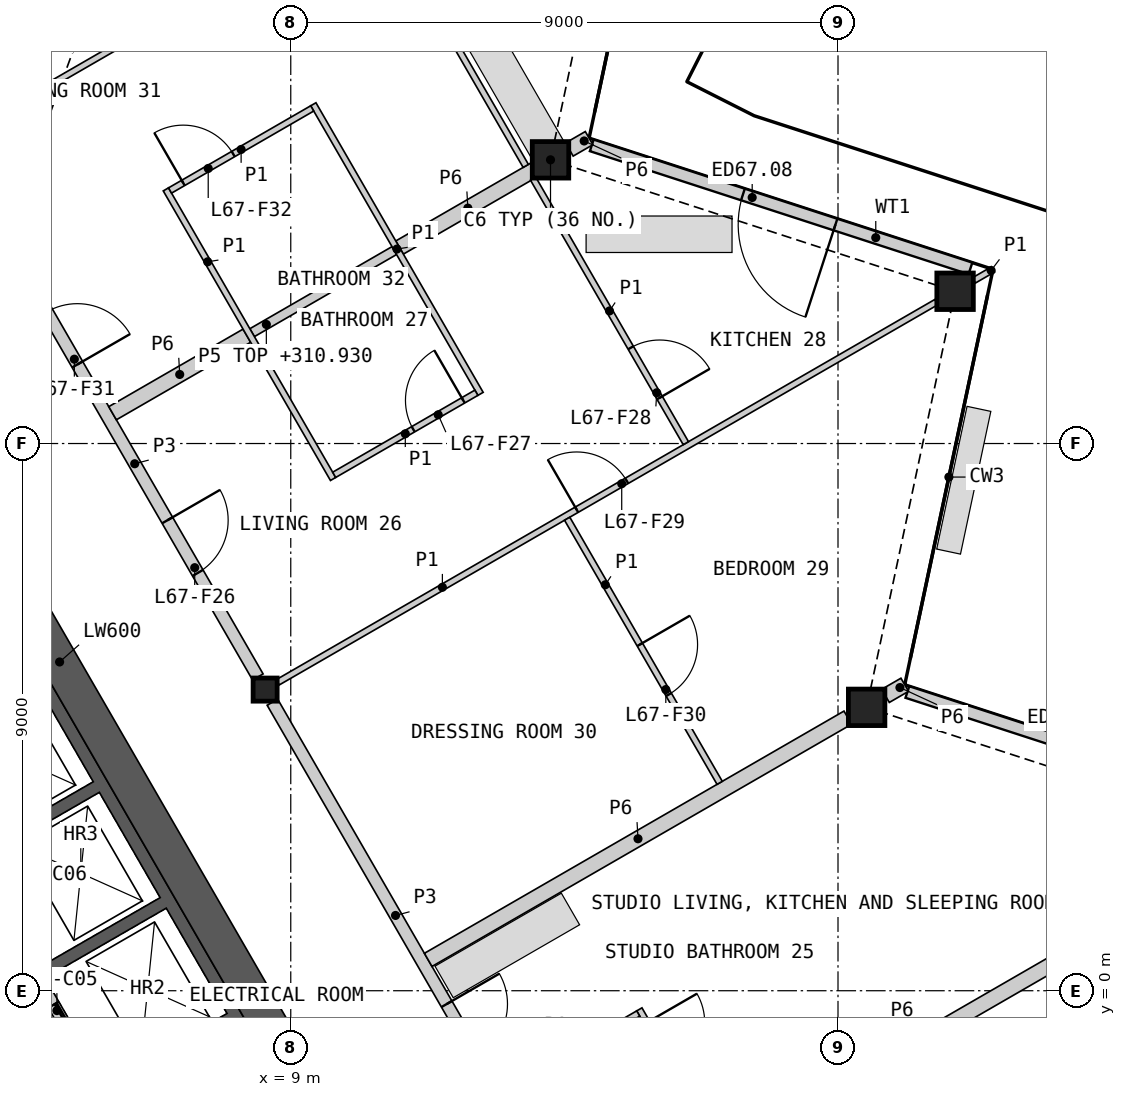
"""IFC4 building model, lengths in metres.
Left out: names, types, materials, properties, quantities, classifications, styles, units other than length and angle.
Written with IfcOpenShell. Run it as: python <this file> out.ifc"""

import sys

from ifc_helpers import new_model, si_unit, direction, frame, frame_2d, origin, origin_2d, place, context, subcontext, project, spatial, polyline, rectangle, hollow_rectangle, i_section, outline, extrude, element, fill, save


model = new_model("IFC4")
c1 = context("Model", 3, precision=1e-05, world=origin(), true_north=direction((0.0, 1.0)))
c2 = subcontext(c1, "Body", "Model", "MODEL_VIEW")
j1 = project(units=[si_unit("LENGTHUNIT", "METRE"), si_unit("PLANEANGLEUNIT", "RADIAN")], contexts=[c1])
p1 = place(None, origin())
s1 = spatial("IfcSite", under=j1, at=p1, CompositionType="ELEMENT")
p2 = place(p1, origin())
s2 = spatial("IfcBuilding", under=s1, at=p2, CompositionType="ELEMENT")
p3 = place(p2, frame((0.0, 0.0, 308.6)))
s3 = spatial("IfcBuildingStorey", under=s2, at=p3, CompositionType="ELEMENT", Elevation=308.6)
for number, where, z_axis, x_axis in (
    (1, (18.471, 4.661, 0.0), (0.0, 0.0, 1.0), (1.0, 0.0, 0.0)),
    (2, (19.926, 11.504, 0.0), (0.0, 0.0, 1.0), (1.0, 0.0, 0.0)),
    (3, (13.272, 13.666, 0.0), (0.0, 0.0, 1.0), (1.0, 0.0, 0.0)),
):
    element("IfcColumn", number, at=place(p3, frame(where, z_axis=z_axis, x_axis=x_axis)), inside=s3, PredefinedType="COLUMN", context=c2, shape_type="SweptSolid", body=[
        extrude(hollow_rectangle(XDim=0.6, YDim=0.6, WallThickness=0.04, at=origin_2d()), origin(), (0.0, 0.0, 1.0), 3.4),
    ])
p4 = place(p3, frame((8.578, 4.953, 0.0), z_axis=(0.0, 0.0, 1.0), x_axis=(1.0, 0.0, 0.0)))
e4 = element("IfcColumn", 4, at=p4, inside=s3, PredefinedType="COLUMN", context=c2, shape_type="SweptSolid", body=[
    extrude(i_section(OverallWidth=0.396, OverallDepth=0.381, WebThickness=0.019, FlangeThickness=0.03, at=origin_2d()), origin(), (0.0, 0.0, 1.0), 3.4),
])
p5 = place(p3, frame((25.398, 2.88, 0.0), z_axis=(0.0, 0.0, 1.0), x_axis=(-0.95105697409, 0.309015585424, 0.0)))
e5 = element("IfcWall", 5, at=p5, inside=s3, PredefinedType="SOLIDWALL", context=c2, shape_type="SweptSolid", body=[
    extrude(rectangle(XDim=6.579, YDim=0.2, at=frame_2d((3.29, 0.0))), origin(), (0.0, 0.0, 1.0), 2.488),
])
p6 = place(p5, frame((2.364, 0.0, 0.0)))
e6 = element("IfcOpeningElement", 6, at=p6, cuts=e5, PredefinedType="OPENING", context=c2, shape_type="SweptSolid", body=[
    extrude(rectangle(XDim=1.6, YDim=2.25, at=frame_2d((0.8, 1.125))), frame((0.0, 0.11, 0.0), z_axis=(0.0, -1.0, 0.0), x_axis=(1.0, 0.0, 0.0)), (0.0, 0.0, 1.0), 0.22),
])
p7 = place(p3, frame((20.178, 11.88, 0.0), z_axis=(0.0, 0.0, 1.0), x_axis=(-0.951053245104, 0.309027061884, 0.0)))
e7 = element("IfcWall", 7, at=p7, inside=s3, PredefinedType="SOLIDWALL", context=c2, shape_type="SweptSolid", body=[
    extrude(rectangle(XDim=6.549, YDim=0.2, at=frame_2d((3.274, 0.0))), origin(), (0.0, 0.0, 1.0), 2.488),
])
p8 = place(p7, frame((2.334, 0.0, 0.0)))
e8 = element("IfcOpeningElement", 8, at=p8, cuts=e7, PredefinedType="OPENING", context=c2, shape_type="SweptSolid", body=[
    extrude(rectangle(XDim=1.6, YDim=2.25, at=frame_2d((0.8, 1.125))), frame((0.0, 0.11, 0.0), z_axis=(0.0, -1.0, 0.0), x_axis=(1.0, 0.0, 0.0)), (0.0, 0.0, 1.0), 0.22),
])
p9 = place(p3, origin())
e9 = element("IfcWall", 9, at=p9, inside=s3, PredefinedType="SHEAR", context=c2, shape_type="SweptSolid", body=[
    extrude(outline(polyline([(1.561, 6.097), (3.731, 7.35), (8.231, -0.444), (6.061, -1.697), (5.96, -1.524), (7.952, -0.374), (6.952, 1.358), (4.96, 0.208), (4.861, 0.381), (6.852, 1.531), (5.852, 3.263), (3.861, 2.113), (3.76, 2.287), (5.752, 3.437), (4.752, 5.169), (2.76, 4.019), (2.66, 4.192), (4.652, 5.342), (3.652, 7.074), (1.66, 5.924), (1.561, 6.097)])), origin(), (0.0, 0.0, 1.0), 3.1),
])
p10 = place(p3, frame((5.817, -1.476, 0.0), z_axis=(0.0, 0.0, 1.0), x_axis=(-0.500002616675, 0.866023893041, 0.0)))
e10 = element("IfcWall", 10, at=p10, inside=s3, PredefinedType="SOLIDWALL", context=c2, shape_type="SweptSolid", body=[
    extrude(rectangle(XDim=8.373, YDim=0.2, at=frame_2d((4.187, 0.0))), origin(), (0.0, 0.0, 1.0), 3.1),
])
p11 = place(p10, frame((0.337, 0.0, 0.0)))
e11 = element("IfcOpeningElement", 11, at=p11, cuts=e10, PredefinedType="OPENING", context=c2, shape_type="SweptSolid", body=[
    extrude(rectangle(XDim=1.1, YDim=2.1, at=frame_2d((0.55, 1.05))), frame((0.0, 0.11, 0.0), z_axis=(0.0, -1.0, 0.0), x_axis=(1.0, 0.0, 0.0)), (0.0, 0.0, 1.0), 0.22),
])
p12 = place(p10, frame((2.537, 0.0, 0.0)))
e12 = element("IfcOpeningElement", 12, at=p12, cuts=e10, PredefinedType="OPENING", context=c2, shape_type="SweptSolid", body=[
    extrude(rectangle(XDim=1.1, YDim=2.1, at=frame_2d((0.55, 1.05))), frame((0.0, 0.11, 0.0), z_axis=(0.0, -1.0, 0.0), x_axis=(1.0, 0.0, 0.0)), (0.0, 0.0, 1.0), 0.22),
])
p13 = place(p10, frame((4.737, 0.0, 0.0)))
e13 = element("IfcOpeningElement", 13, at=p13, cuts=e10, PredefinedType="OPENING", context=c2, shape_type="SweptSolid", body=[
    extrude(rectangle(XDim=1.1, YDim=2.1, at=frame_2d((0.55, 1.05))), frame((0.0, 0.11, 0.0), z_axis=(0.0, -1.0, 0.0), x_axis=(1.0, 0.0, 0.0)), (0.0, 0.0, 1.0), 0.22),
])
p14 = place(p10, frame((7.037, 0.0, 0.0)))
e14 = element("IfcOpeningElement", 14, at=p14, cuts=e10, PredefinedType="OPENING", context=c2, shape_type="SweptSolid", body=[
    extrude(rectangle(XDim=0.9, YDim=2.1, at=frame_2d((0.45, 1.05))), frame((0.0, 0.11, 0.0), z_axis=(0.0, -1.0, 0.0), x_axis=(1.0, 0.0, 0.0)), (0.0, 0.0, 1.0), 0.22),
])
p15 = place(p3, frame((8.841, -0.902, 0.0), z_axis=(0.0, 0.0, 1.0), x_axis=(-0.499995618375, 0.866027933502, 0.0)))
e15 = element("IfcWall", 15, at=p15, inside=s3, PredefinedType="SHEAR", context=c2, shape_type="SweptSolid", body=[
    extrude(rectangle(XDim=14.571, YDim=0.6, at=frame_2d((7.285, 0.0))), origin(), (0.0, 0.0, 1.0), 3.1),
])
p16 = place(p3, frame((13.856, -3.988, 0.0), z_axis=(0.0, 0.0, 1.0), x_axis=(0.866021406514, 0.500006923412, 0.0)))
e16 = element("IfcWall", 16, at=p16, inside=s3, PredefinedType="PARTITIONING", context=c2, shape_type="SweptSolid", body=[
    extrude(rectangle(XDim=12.654, YDim=0.25, at=frame_2d((6.327, 0.0))), origin(), (0.0, 0.0, 1.0), 2.33),
])
p17 = place(p3, frame((4.409, 12.174, 0.0), z_axis=(0.0, 0.0, 1.0), x_axis=(0.499984266882, -0.866034487114, 0.0)))
e17 = element("IfcWall", 17, at=p17, inside=s3, PredefinedType="PARTITIONING", context=c2, shape_type="SweptSolid", body=[
    extrude(rectangle(XDim=8.099, YDim=0.2, at=frame_2d((4.049, 0.0))), origin(), (0.0, 0.0, 1.0), 3.1),
])
p18 = place(p17, frame((5.123, 0.0, 0.0)))
e18 = element("IfcOpeningElement", 18, at=p18, cuts=e17, PredefinedType="OPENING", context=c2, shape_type="SweptSolid", body=[
    extrude(rectangle(XDim=1.0, YDim=2.1, at=frame_2d((0.5, 1.05))), frame((0.0, 0.11, 0.0), z_axis=(0.0, -1.0, 0.0), x_axis=(1.0, 0.0, 0.0)), (0.0, 0.0, 1.0), 0.22),
])
p19 = place(p17, frame((1.164, 0.0, 0.0)))
e19 = element("IfcOpeningElement", 19, at=p19, cuts=e17, PredefinedType="OPENING", context=c2, shape_type="SweptSolid", body=[
    extrude(rectangle(XDim=1.0, YDim=2.1, at=frame_2d((0.5, 1.05))), frame((0.0, 0.11, 0.0), z_axis=(0.0, -1.0, 0.0), x_axis=(1.0, 0.0, 0.0)), (0.0, 0.0, 1.0), 0.22),
])
p20 = place(p3, frame((8.698, 4.745, 0.0), z_axis=(0.0, 0.0, 1.0), x_axis=(0.499984266882, -0.866034487114, 0.0)))
e20 = element("IfcWall", 20, at=p20, inside=s3, PredefinedType="PARTITIONING", context=c2, shape_type="SweptSolid", body=[
    extrude(rectangle(XDim=8.099, YDim=0.2, at=frame_2d((4.049, 0.0))), origin(), (0.0, 0.0, 1.0), 3.1),
])
p21 = place(p20, frame((5.732, 0.0, 0.0)))
e21 = element("IfcOpeningElement", 21, at=p21, cuts=e20, PredefinedType="OPENING", context=c2, shape_type="SweptSolid", body=[
    extrude(rectangle(XDim=1.0, YDim=2.1, at=frame_2d((0.5, 1.05))), frame((0.0, 0.11, 0.0), z_axis=(0.0, -1.0, 0.0), x_axis=(1.0, 0.0, 0.0)), (0.0, 0.0, 1.0), 0.22),
])
p22 = place(p3, frame((11.26, 0.507, 0.0), z_axis=(0.0, 0.0, 1.0), x_axis=(0.86602842894, 0.499994760241, 0.0)))
e22 = element("IfcWall", 22, at=p22, inside=s3, PredefinedType="PARTITIONING", context=c2, shape_type="SweptSolid", body=[
    extrude(rectangle(XDim=7.968, YDim=0.25, at=frame_2d((3.984, 0.0))), origin(), (0.0, 0.0, 1.0), 2.33),
])
p23 = place(p3, frame((6.07, 9.498, 0.0), z_axis=(0.0, 0.0, 1.0), x_axis=(0.866054858364, 0.499948979701, 0.0)))
e23 = element("IfcWall", 23, at=p23, inside=s3, PredefinedType="PARTITIONING", context=c2, shape_type="SweptSolid", body=[
    extrude(rectangle(XDim=2.55, YDim=0.25, at=frame_2d((1.275, 0.0))), origin(), (0.0, 0.0, 1.0), 2.33),
])
p24 = place(p3, frame((10.789, 12.223, 0.0), z_axis=(0.0, 0.0, 1.0), x_axis=(0.866033547976, 0.499985893582, 0.0)))
e24 = element("IfcWall", 24, at=p24, inside=s3, PredefinedType="PARTITIONING", context=c2, shape_type="SweptSolid", body=[
    extrude(rectangle(XDim=2.594, YDim=0.25, at=frame_2d((1.297, 0.0))), origin(), (0.0, 0.0, 1.0), 2.33),
])
p25 = place(p3, frame((13.582, 13.835, 0.0), z_axis=(0.0, 0.0, 1.0), x_axis=(0.865827443207, 0.500342721131, 0.0)))
e25 = element("IfcWall", 25, at=p25, inside=s3, PredefinedType="PARTITIONING", context=c2, shape_type="SweptSolid", body=[
    extrude(rectangle(XDim=0.375, YDim=0.25, at=frame_2d((0.188, 0.0))), origin(), (0.0, 0.0, 1.0), 2.33),
])
p26 = place(p3, frame((18.781, 4.849, 0.0), z_axis=(0.0, 0.0, 1.0), x_axis=(0.86609656662, 0.499876722092, 0.0)))
e26 = element("IfcWall", 26, at=p26, inside=s3, PredefinedType="PARTITIONING", context=c2, shape_type="SweptSolid", body=[
    extrude(rectangle(XDim=0.365, YDim=0.25, at=frame_2d((0.183, 0.0))), origin(), (0.0, 0.0, 1.0), 2.33),
])
p27 = place(p3, frame((8.365, 10.823, 0.0), z_axis=(0.0, 0.0, 1.0), x_axis=(0.866019956843, 0.50000943426, 0.0)))
e27 = element("IfcWall", 27, at=p27, inside=s3, PredefinedType="PLUMBINGWALL", context=c2, shape_type="SweptSolid", body=[
    extrude(rectangle(XDim=2.7, YDim=0.15, at=frame_2d((1.35, 0.0))), origin(), (0.0, 0.0, 1.0), 2.33),
])
p28 = place(p3, frame((3.474, 13.994, 0.0), z_axis=(0.0, 0.0, 1.0), x_axis=(0.866032424046, 0.499987840353, 0.0)))
e28 = element("IfcWall", 28, at=p28, inside=s3, PredefinedType="PARTITIONING", context=c2, shape_type="SweptSolid", body=[
    extrude(rectangle(XDim=12.635, YDim=0.1, at=frame_2d((6.317, 0.0))), origin(), (0.0, 0.0, 1.0), 2.33),
])
p29 = place(p28, frame((8.714, 0.0, 0.0)))
e29 = element("IfcOpeningElement", 29, at=p29, cuts=e28, PredefinedType="OPENING", context=c2, shape_type="SweptSolid", body=[
    extrude(rectangle(XDim=0.95, YDim=2.1, at=frame_2d((0.475, 1.05))), frame((0.0, 0.06, 0.0), z_axis=(0.0, -1.0, 0.0), x_axis=(1.0, 0.0, 0.0)), (0.0, 0.0, 1.0), 0.12),
])
p30 = place(p3, frame((8.786, 5.073, 0.0), z_axis=(0.0, 0.0, 1.0), x_axis=(0.86602139559, 0.500006942333, 0.0)))
e30 = element("IfcWall", 30, at=p30, inside=s3, PredefinedType="PARTITIONING", context=c2, shape_type="SweptSolid", body=[
    extrude(rectangle(XDim=12.505, YDim=0.1, at=frame_2d((6.252, 0.0))), origin(), (0.0, 0.0, 1.0), 2.33),
])
p31 = place(p30, frame((5.677, 0.0, 0.0)))
e31 = element("IfcOpeningElement", 31, at=p31, cuts=e30, PredefinedType="OPENING", context=c2, shape_type="SweptSolid", body=[
    extrude(rectangle(XDim=0.95, YDim=2.1, at=frame_2d((0.475, 1.05))), frame((0.0, 0.06, 0.0), z_axis=(0.0, -1.0, 0.0), x_axis=(1.0, 0.0, 0.0)), (0.0, 0.0, 1.0), 0.12),
])
p32 = place(p3, frame((14.733, -0.307, 0.0), z_axis=(0.0, 0.0, 1.0), x_axis=(0.499996545922, -0.866027397988, 0.0)))
e32 = element("IfcWall", 32, at=p32, inside=s3, PredefinedType="PARTITIONING", context=c2, shape_type="SweptSolid", body=[
    extrude(rectangle(XDim=5.5, YDim=0.1, at=frame_2d((2.75, 0.0))), origin(), (0.0, 0.0, 1.0), 2.33),
])
p33 = place(p32, frame((0.25, 0.0, 0.0)))
e33 = element("IfcOpeningElement", 33, at=p33, cuts=e32, PredefinedType="OPENING", context=c2, shape_type="SweptSolid", body=[
    extrude(rectangle(XDim=0.95, YDim=2.1, at=frame_2d((0.475, 1.05))), frame((0.0, 0.06, 0.0), z_axis=(0.0, -1.0, 0.0), x_axis=(1.0, 0.0, 0.0)), (0.0, 0.0, 1.0), 0.12),
])
p34 = place(p3, frame((9.371, 14.58, 0.0), z_axis=(0.0, 0.0, 1.0), x_axis=(0.499996545922, -0.866027397988, 0.0)))
e34 = element("IfcWall", 34, at=p34, inside=s3, PredefinedType="PARTITIONING", context=c2, shape_type="SweptSolid", body=[
    extrude(rectangle(XDim=5.5, YDim=0.1, at=frame_2d((2.75, 0.0))), origin(), (0.0, 0.0, 1.0), 2.33),
])
p35 = place(p3, frame((6.946, 13.18, 0.0), z_axis=(0.0, 0.0, 1.0), x_axis=(0.500015767406, -0.866016300277, 0.0)))
e35 = element("IfcWall", 35, at=p35, inside=s3, PredefinedType="PARTITIONING", context=c2, shape_type="SweptSolid", body=[
    extrude(rectangle(XDim=5.5, YDim=0.1, at=frame_2d((2.75, 0.0))), origin(), (0.0, 0.0, 1.0), 2.33),
])
p36 = place(p3, frame((10.357, 17.91, 0.0), z_axis=(0.0, 0.0, 1.0), x_axis=(0.50000754391, -0.866021048262, 0.0)))
e36 = element("IfcWall", 36, at=p36, inside=s3, PredefinedType="PARTITIONING", context=c2, shape_type="SweptSolid", body=[
    extrude(rectangle(XDim=5.016, YDim=0.1, at=frame_2d((2.508, 0.0))), origin(), (0.0, 0.0, 1.0), 2.33),
])
p37 = place(p36, frame((0.861, 0.0, 0.0)))
e37 = element("IfcOpeningElement", 37, at=p37, cuts=e36, PredefinedType="OPENING", context=c2, shape_type="SweptSolid", body=[
    extrude(rectangle(XDim=0.95, YDim=2.1, at=frame_2d((0.475, 1.05))), frame((0.0, 0.06, 0.0), z_axis=(0.0, -1.0, 0.0), x_axis=(1.0, 0.0, 0.0)), (0.0, 0.0, 1.0), 0.12),
])
p38 = place(p3, frame((13.546, 7.763, 0.0), z_axis=(0.0, 0.0, 1.0), x_axis=(0.500028620461, -0.866008879123, 0.0)))
e38 = element("IfcWall", 38, at=p38, inside=s3, PredefinedType="PARTITIONING", context=c2, shape_type="SweptSolid", body=[
    extrude(rectangle(XDim=5.016, YDim=0.1, at=frame_2d((2.508, 0.0))), origin(), (0.0, 0.0, 1.0), 2.33),
])
p39 = place(p38, frame((2.39, 0.0, 0.0)))
e39 = element("IfcOpeningElement", 39, at=p39, cuts=e38, PredefinedType="OPENING", context=c2, shape_type="SweptSolid", body=[
    extrude(rectangle(XDim=0.95, YDim=2.1, at=frame_2d((0.475, 1.05))), frame((0.0, 0.06, 0.0), z_axis=(0.0, -1.0, 0.0), x_axis=(1.0, 0.0, 0.0)), (0.0, 0.0, 1.0), 0.12),
])
p40 = place(p3, frame((12.986, 13.356, 0.0), z_axis=(0.0, 0.0, 1.0), x_axis=(0.500007128048, -0.866021288365, 0.0)))
e40 = element("IfcWall", 40, at=p40, inside=s3, PredefinedType="PARTITIONING", context=c2, shape_type="SweptSolid", body=[
    extrude(rectangle(XDim=5.023, YDim=0.1, at=frame_2d((2.512, 0.0))), origin(), (0.0, 0.0, 1.0), 2.33),
])
p41 = place(p40, frame((3.211, 0.0, 0.0)))
e41 = element("IfcOpeningElement", 41, at=p41, cuts=e40, PredefinedType="OPENING", context=c2, shape_type="SweptSolid", body=[
    extrude(rectangle(XDim=0.95, YDim=2.1, at=frame_2d((0.475, 1.05))), frame((0.0, 0.06, 0.0), z_axis=(0.0, -1.0, 0.0), x_axis=(1.0, 0.0, 0.0)), (0.0, 0.0, 1.0), 0.12),
])
p42 = place(p3, frame((7.015, 13.162, 0.0), z_axis=(0.0, 0.0, 1.0), x_axis=(0.866036505625, 0.499980770555, 0.0)))
e42 = element("IfcWall", 42, at=p42, inside=s3, PredefinedType="PARTITIONING", context=c2, shape_type="SweptSolid", body=[
    extrude(rectangle(XDim=2.7, YDim=0.1, at=frame_2d((1.35, 0.0))), origin(), (0.0, 0.0, 1.0), 2.33),
])
p43 = place(p42, frame((0.25, 0.0, 0.0)))
e43 = element("IfcOpeningElement", 43, at=p43, cuts=e42, PredefinedType="OPENING", context=c2, shape_type="SweptSolid", body=[
    extrude(rectangle(XDim=0.95, YDim=2.1, at=frame_2d((0.475, 1.05))), frame((0.0, 0.06, 0.0), z_axis=(0.0, -1.0, 0.0), x_axis=(1.0, 0.0, 0.0)), (0.0, 0.0, 1.0), 0.12),
])
p44 = place(p3, frame((9.715, 8.485, 0.0), z_axis=(0.0, 0.0, 1.0), x_axis=(0.866036505625, 0.499980770555, 0.0)))
e44 = element("IfcWall", 44, at=p44, inside=s3, PredefinedType="PARTITIONING", context=c2, shape_type="SweptSolid", body=[
    extrude(rectangle(XDim=2.7, YDim=0.1, at=frame_2d((1.35, 0.0))), origin(), (0.0, 0.0, 1.0), 2.33),
])
p45 = place(p44, frame((1.5, 0.0, 0.0)))
e45 = element("IfcOpeningElement", 45, at=p45, cuts=e44, PredefinedType="OPENING", context=c2, shape_type="SweptSolid", body=[
    extrude(rectangle(XDim=0.95, YDim=2.1, at=frame_2d((0.475, 1.05))), frame((0.0, 0.06, 0.0), z_axis=(0.0, -1.0, 0.0), x_axis=(1.0, 0.0, 0.0)), (0.0, 0.0, 1.0), 0.12),
])
p46 = place(p3, frame((12.506, -1.65, 0.0), z_axis=(0.0, 0.0, 1.0), x_axis=(0.866030925526, 0.499990435942, 0.0)))
e46 = element("IfcWall", 46, at=p46, inside=s3, PredefinedType="PARTITIONING", context=c2, shape_type="SweptSolid", body=[
    extrude(rectangle(XDim=2.55, YDim=0.1, at=frame_2d((1.275, 0.0))), origin(), (0.0, 0.0, 1.0), 2.33),
])
p47 = place(p3, frame((20.236, 11.683, 0.0), z_axis=(0.0, 0.0, 1.0), x_axis=(0.866039913117, 0.499974868256, 0.0)))
e47 = element("IfcWall", 47, at=p47, inside=s3, PredefinedType="PARTITIONING", context=c2, shape_type="SweptSolid", body=[
    extrude(rectangle(XDim=0.363, YDim=0.1, at=frame_2d((0.181, 0.0))), origin(), (0.0, 0.0, 1.0), 2.33),
])
p48 = place(p8, origin())
e48 = element("IfcDoor", 48, at=p48, inside=s3, OperationType="DOUBLE_DOOR_SINGLE_SWING", PredefinedType="DOOR", context=c2, shape_type="SweptSolid", body=[
    extrude(rectangle(XDim=1.6, YDim=2.25, at=frame_2d((0.8, 1.125))), frame((0.0, 0.025, 0.0), z_axis=(0.0, -1.0, 0.0), x_axis=(1.0, 0.0, 0.0)), (0.0, 0.0, 1.0), 0.05),
])
fill(e8, e48)
p49 = place(p11, origin())
e49 = element("IfcDoor", 49, at=p49, inside=s3, OperationType="SLIDING_TO_LEFT", PredefinedType="DOOR", context=c2, shape_type="SweptSolid", body=[
    extrude(rectangle(XDim=1.1, YDim=2.1, at=frame_2d((0.55, 1.05))), frame((0.0, 0.025, 0.0), z_axis=(0.0, -1.0, 0.0), x_axis=(1.0, 0.0, 0.0)), (0.0, 0.0, 1.0), 0.05),
])
fill(e11, e49)
p50 = place(p21, origin())
e50 = element("IfcDoor", 50, at=p50, inside=s3, OperationType="SINGLE_SWING_LEFT", PredefinedType="DOOR", context=c2, shape_type="SweptSolid", body=[
    extrude(rectangle(XDim=1.0, YDim=2.1, at=frame_2d((0.5, 1.05))), frame((0.0, 0.025, 0.0), z_axis=(0.0, -1.0, 0.0), x_axis=(1.0, 0.0, 0.0)), (0.0, 0.0, 1.0), 0.05),
])
fill(e21, e50)
p51 = place(p18, origin())
e51 = element("IfcDoor", 51, at=p51, inside=s3, OperationType="SINGLE_SWING_LEFT", PredefinedType="DOOR", context=c2, shape_type="SweptSolid", body=[
    extrude(rectangle(XDim=1.0, YDim=2.1, at=frame_2d((0.5, 1.05))), frame((0.0, 0.025, 0.0), z_axis=(0.0, -1.0, 0.0), x_axis=(1.0, 0.0, 0.0)), (0.0, 0.0, 1.0), 0.05),
])
fill(e18, e51)
p52 = place(p45, origin())
e52 = element("IfcDoor", 52, at=p52, inside=s3, OperationType="SINGLE_SWING_RIGHT", PredefinedType="DOOR", context=c2, shape_type="SweptSolid", body=[
    extrude(rectangle(XDim=0.95, YDim=2.1, at=frame_2d((0.475, 1.05))), frame((0.0, 0.025, 0.0), z_axis=(0.0, -1.0, 0.0), x_axis=(1.0, 0.0, 0.0)), (0.0, 0.0, 1.0), 0.05),
])
fill(e45, e52)
p53 = place(p41, origin())
e53 = element("IfcDoor", 53, at=p53, inside=s3, OperationType="SINGLE_SWING_RIGHT", PredefinedType="DOOR", context=c2, shape_type="SweptSolid", body=[
    extrude(rectangle(XDim=0.95, YDim=2.1, at=frame_2d((0.475, 1.05))), frame((0.0, 0.025, 0.0), z_axis=(0.0, -1.0, 0.0), x_axis=(1.0, 0.0, 0.0)), (0.0, 0.0, 1.0), 0.05),
])
fill(e41, e53)
p54 = place(p31, origin())
e54 = element("IfcDoor", 54, at=p54, inside=s3, OperationType="SINGLE_SWING_LEFT", PredefinedType="DOOR", context=c2, shape_type="SweptSolid", body=[
    extrude(rectangle(XDim=0.95, YDim=2.1, at=frame_2d((0.475, 1.05))), frame((0.0, 0.025, 0.0), z_axis=(0.0, -1.0, 0.0), x_axis=(1.0, 0.0, 0.0)), (0.0, 0.0, 1.0), 0.05),
])
fill(e31, e54)
p55 = place(p39, origin())
e55 = element("IfcDoor", 55, at=p55, inside=s3, OperationType="SINGLE_SWING_LEFT", PredefinedType="DOOR", context=c2, shape_type="SweptSolid", body=[
    extrude(rectangle(XDim=0.95, YDim=2.1, at=frame_2d((0.475, 1.05))), frame((0.0, 0.025, 0.0), z_axis=(0.0, -1.0, 0.0), x_axis=(1.0, 0.0, 0.0)), (0.0, 0.0, 1.0), 0.05),
])
fill(e39, e55)
p56 = place(p19, origin())
e56 = element("IfcDoor", 56, at=p56, inside=s3, OperationType="SINGLE_SWING_RIGHT", PredefinedType="DOOR", context=c2, shape_type="SweptSolid", body=[
    extrude(rectangle(XDim=1.0, YDim=2.1, at=frame_2d((0.5, 1.05))), frame((0.0, 0.025, 0.0), z_axis=(0.0, -1.0, 0.0), x_axis=(1.0, 0.0, 0.0)), (0.0, 0.0, 1.0), 0.05),
])
fill(e19, e56)
p57 = place(p43, origin())
e57 = element("IfcDoor", 57, at=p57, inside=s3, OperationType="SINGLE_SWING_LEFT", PredefinedType="DOOR", context=c2, shape_type="SweptSolid", body=[
    extrude(rectangle(XDim=0.95, YDim=2.1, at=frame_2d((0.475, 1.05))), frame((0.0, 0.025, 0.0), z_axis=(0.0, -1.0, 0.0), x_axis=(1.0, 0.0, 0.0)), (0.0, 0.0, 1.0), 0.05),
])
fill(e43, e57)
save(model, sys.argv[1])
